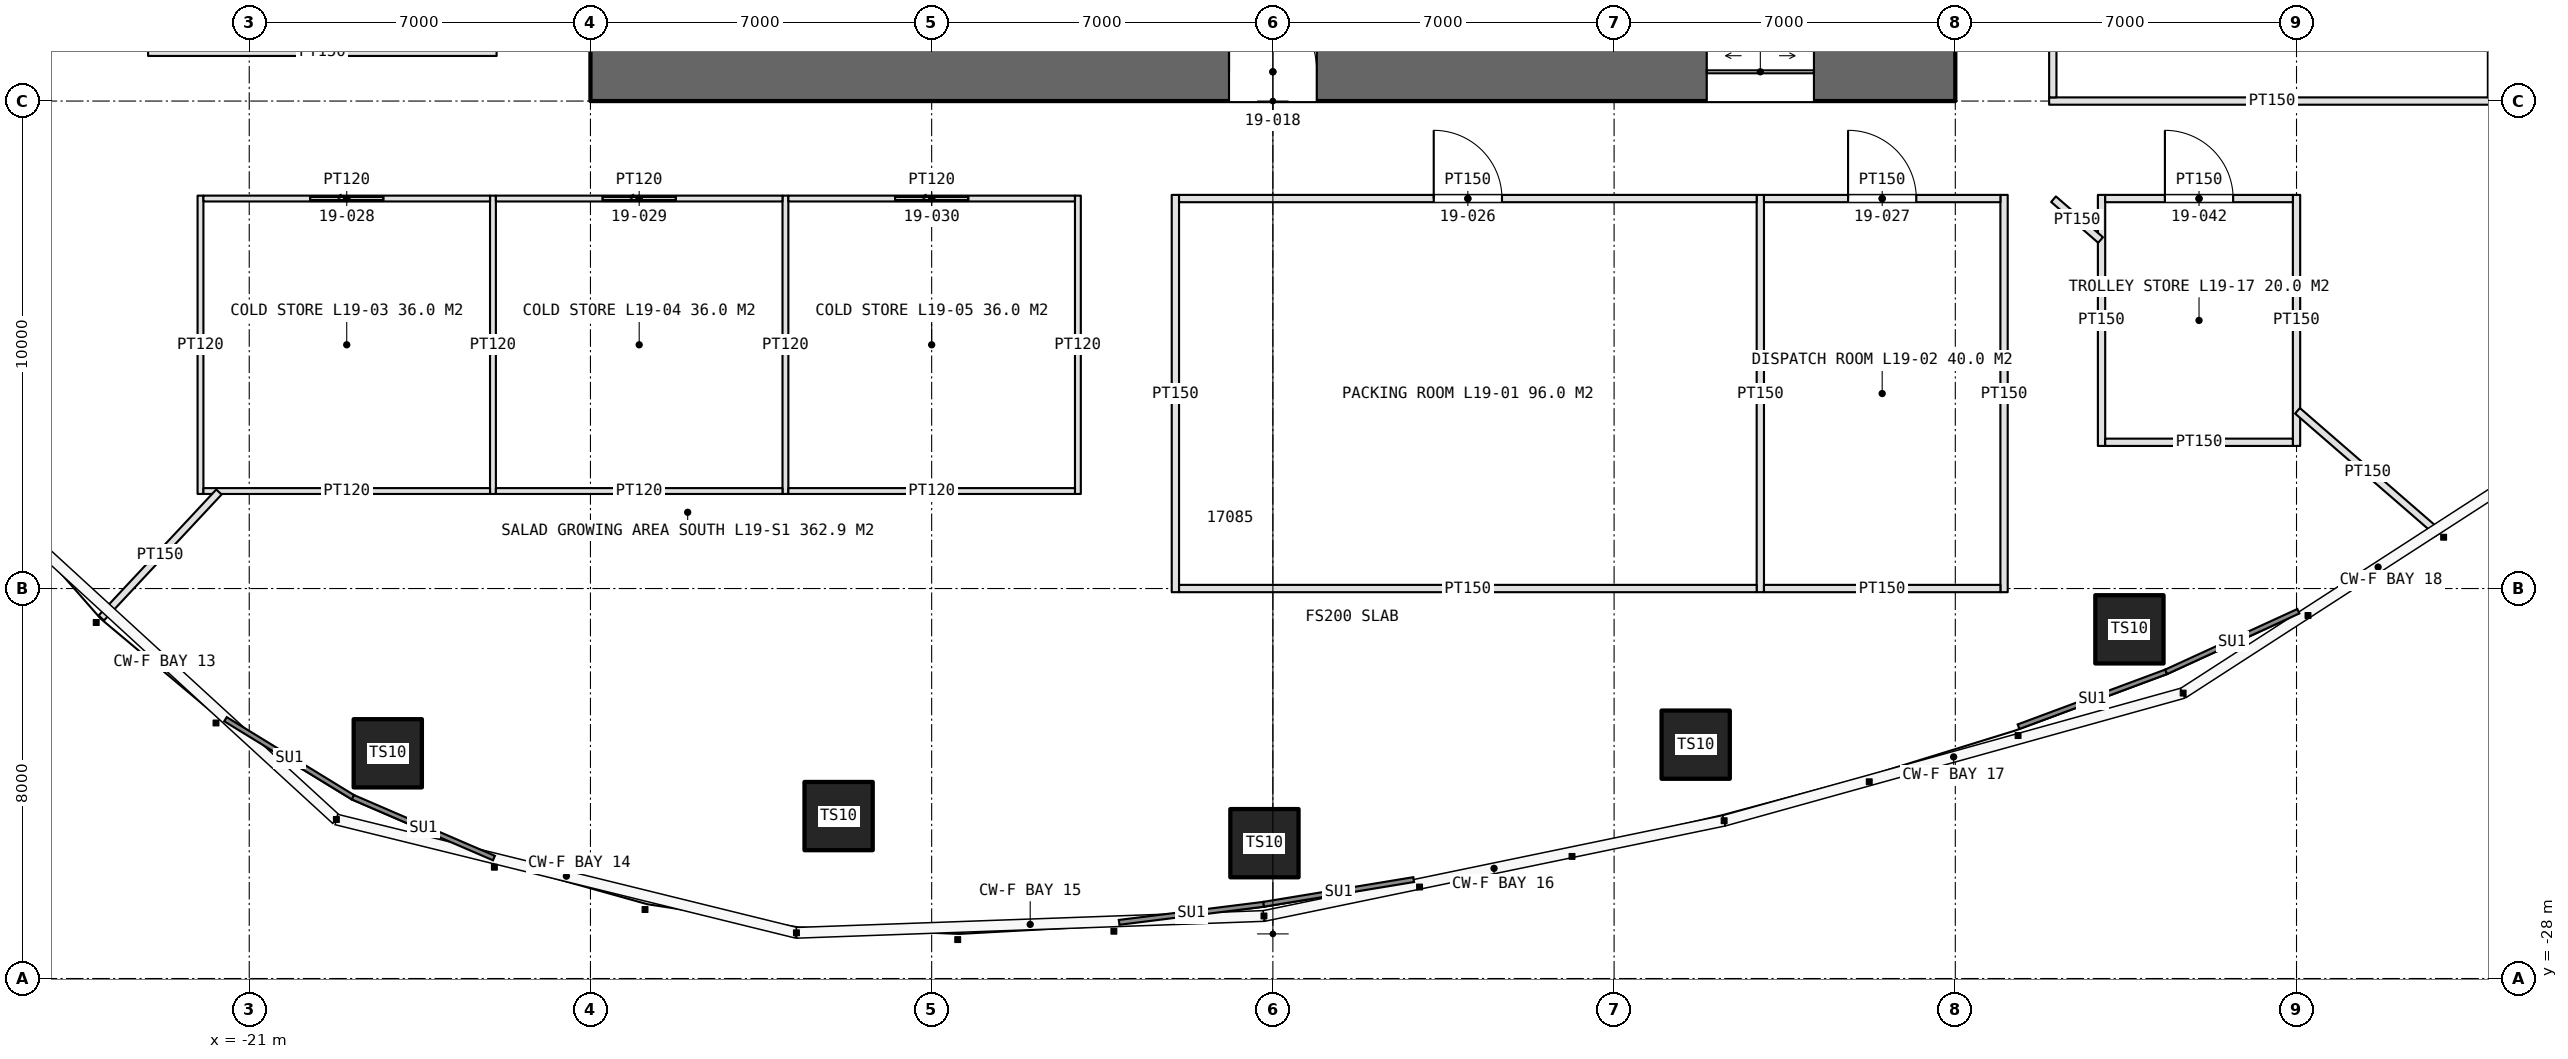
"""IFC4 building model, lengths in metres.
Left out: names, types, materials, properties, quantities, classifications, styles, units other than length and angle.
Written with IfcOpenShell. Run it as: python <this file> out.ifc"""

import sys

from ifc_helpers import new_model, si_unit, direction, frame, frame_2d, origin, origin_2d, place, context, subcontext, project, spatial, rectangle, hollow_rectangle, extrude, element, fill, save


model = new_model("IFC4")
c1 = context("Model", 3, precision=1e-05, world=origin(), true_north=direction((0.0, 1.0)))
c2 = subcontext(c1, "Body", "Model", "MODEL_VIEW")
j1 = project(units=[si_unit("LENGTHUNIT", "METRE"), si_unit("PLANEANGLEUNIT", "RADIAN")], contexts=[c1])
p1 = place(None, origin())
s1 = spatial("IfcSite", under=j1, at=p1, CompositionType="ELEMENT")
p2 = place(p1, origin())
s2 = spatial("IfcBuilding", under=s1, at=p2, CompositionType="ELEMENT")
p3 = place(p2, frame((0.0, 0.0, 95.0)))
s3 = spatial("IfcBuildingStorey", under=s2, at=p3, CompositionType="ELEMENT", Elevation=95.0)
p4 = place(p3, frame((-14.0, -9.4, 0.0), z_axis=(0.0, 0.0, 1.0), x_axis=(1.0, 0.0, 0.0)))
e1 = element("IfcWall", 1, at=p4, inside=s3, PredefinedType="SHEAR", context=c2, shape_type="SweptSolid", body=[
    extrude(rectangle(XDim=28.0, YDim=1.2, at=frame_2d((14.0, 0.0))), origin(), (0.0, 0.0, 1.0), 5.0),
])
p5 = place(p4, frame((13.1, 0.0, 0.0)))
e2 = element("IfcOpeningElement", 2, at=p5, cuts=e1, PredefinedType="OPENING", context=c2, shape_type="SweptSolid", body=[
    extrude(rectangle(XDim=1.8, YDim=2.4, at=frame_2d((0.9, 1.2))), frame((0.0, 0.61, 0.0), z_axis=(0.0, -1.0, 0.0), x_axis=(1.0, 0.0, 0.0)), (0.0, 0.0, 1.0), 1.22),
])
p6 = place(p4, frame((22.9, 0.0, 0.0)))
e3 = element("IfcOpeningElement", 3, at=p6, cuts=e1, PredefinedType="OPENING", context=c2, shape_type="SweptSolid", body=[
    extrude(rectangle(XDim=2.2, YDim=2.7, at=frame_2d((1.1, 1.35))), frame((0.0, 0.61, 0.0), z_axis=(0.0, -1.0, 0.0), x_axis=(1.0, 0.0, 0.0)), (0.0, 0.0, 1.0), 1.22),
])
p7 = place(p3, frame((-18.158, -23.38, 0.0), z_axis=(0.0, 0.0, 1.0), x_axis=(1.0, 0.0, 0.0)))
e4 = element("IfcColumn", 4, at=p7, inside=s3, PredefinedType="COLUMN", context=c2, shape_type="SweptSolid", body=[
    extrude(hollow_rectangle(XDim=1.4, YDim=1.4, WallThickness=0.15, at=origin_2d()), origin(), (0.0, 0.0, 1.0), 4.025),
])
for number, where, z_axis, x_axis in (
    (5, (-8.909, -24.668, 0.0), (0.0, 0.0, 1.0), (1.0, 0.0, 0.0)),
    (6, (-0.173, -25.224, 0.0), (0.0, 0.0, 1.0), (1.0, 0.0, 0.0)),
    (7, (8.674, -23.203, 0.0), (0.0, 0.0, 1.0), (1.0, 0.0, 0.0)),
):
    element("IfcColumn", number, at=place(p3, frame(where, z_axis=z_axis, x_axis=x_axis)), inside=s3, PredefinedType="COLUMN", context=c2, shape_type="SweptSolid", body=[
        extrude(hollow_rectangle(XDim=1.4, YDim=1.4, WallThickness=0.15, at=origin_2d()), origin(), (0.0, 0.0, 1.0), 5.0),
    ])
p8 = place(p3, frame((17.572, -20.837, 0.0), z_axis=(0.0, 0.0, 1.0), x_axis=(1.0, 0.0, 0.0)))
e8 = element("IfcColumn", 8, at=p8, inside=s3, PredefinedType="COLUMN", context=c2, shape_type="SweptSolid", body=[
    extrude(hollow_rectangle(XDim=1.4, YDim=1.4, WallThickness=0.15, at=origin_2d()), origin(), (0.0, 0.0, 1.0), 4.025),
])
for number, where, z_axis, x_axis in (
    (9, (-2.0, -11.925, 0.0), (0.0, 0.0, 1.0), (0.0, -1.0, 0.0)),
    (10, (10.0, -11.925, 0.0), (0.0, 0.0, 1.0), (0.0, -1.0, 0.0)),
    (11, (15.0, -11.925, 0.0), (0.0, 0.0, 1.0), (0.0, -1.0, 0.0)),
):
    element("IfcWall", number, at=place(p3, frame(where, z_axis=z_axis, x_axis=x_axis)), inside=s3, PredefinedType="PARTITIONING", context=c2, shape_type="SweptSolid", body=[
        extrude(rectangle(XDim=8.15, YDim=0.15, at=frame_2d((4.075, 0.0))), origin(), (0.0, 0.0, 1.0), 3.6),
    ])
p9 = place(p3, frame((-1.925, -12.0, 0.0), z_axis=(0.0, 0.0, 1.0), x_axis=(1.0, 0.0, 0.0)))
e12 = element("IfcWall", 12, at=p9, inside=s3, PredefinedType="PARTITIONING", context=c2, shape_type="SweptSolid", body=[
    extrude(rectangle(XDim=11.85, YDim=0.15, at=frame_2d((5.925, 0.0))), origin(), (0.0, 0.0, 1.0), 3.6),
])
p10 = place(p9, frame((5.225, 0.0, 0.0)))
e13 = element("IfcOpeningElement", 13, at=p10, cuts=e12, PredefinedType="OPENING", context=c2, shape_type="SweptSolid", body=[
    extrude(rectangle(XDim=1.4, YDim=2.4, at=frame_2d((0.7, 1.2))), frame((0.0, 0.085, 0.0), z_axis=(0.0, -1.0, 0.0), x_axis=(1.0, 0.0, 0.0)), (0.0, 0.0, 1.0), 0.17),
])
p11 = place(p3, frame((-1.925, -20.0, 0.0), z_axis=(0.0, 0.0, 1.0), x_axis=(1.0, 0.0, 0.0)))
e14 = element("IfcWall", 14, at=p11, inside=s3, PredefinedType="PARTITIONING", context=c2, shape_type="SweptSolid", body=[
    extrude(rectangle(XDim=11.85, YDim=0.15, at=frame_2d((5.925, 0.0))), origin(), (0.0, 0.0, 1.0), 3.6),
])
p12 = place(p3, frame((10.075, -12.0, 0.0), z_axis=(0.0, 0.0, 1.0), x_axis=(1.0, 0.0, 0.0)))
e15 = element("IfcWall", 15, at=p12, inside=s3, PredefinedType="PARTITIONING", context=c2, shape_type="SweptSolid", body=[
    extrude(rectangle(XDim=4.85, YDim=0.15, at=frame_2d((2.425, 0.0))), origin(), (0.0, 0.0, 1.0), 3.6),
])
p13 = place(p12, frame((1.725, 0.0, 0.0)))
e16 = element("IfcOpeningElement", 16, at=p13, cuts=e15, PredefinedType="OPENING", context=c2, shape_type="SweptSolid", body=[
    extrude(rectangle(XDim=1.4, YDim=2.4, at=frame_2d((0.7, 1.2))), frame((0.0, 0.085, 0.0), z_axis=(0.0, -1.0, 0.0), x_axis=(1.0, 0.0, 0.0)), (0.0, 0.0, 1.0), 0.17),
])
p14 = place(p3, frame((10.075, -20.0, 0.0), z_axis=(0.0, 0.0, 1.0), x_axis=(1.0, 0.0, 0.0)))
e17 = element("IfcWall", 17, at=p14, inside=s3, PredefinedType="PARTITIONING", context=c2, shape_type="SweptSolid", body=[
    extrude(rectangle(XDim=4.85, YDim=0.15, at=frame_2d((2.425, 0.0))), origin(), (0.0, 0.0, 1.0), 3.6),
])
for number, where, z_axis, x_axis in (
    (18, (-22.0, -11.94, 0.0), (0.0, 0.0, 1.0), (0.0, -1.0, 0.0)),
    (19, (-16.0, -11.94, 0.0), (0.0, 0.0, 1.0), (0.0, -1.0, 0.0)),
    (20, (-10.0, -11.94, 0.0), (0.0, 0.0, 1.0), (0.0, -1.0, 0.0)),
    (21, (-4.0, -11.94, 0.0), (0.0, 0.0, 1.0), (0.0, -1.0, 0.0)),
):
    element("IfcWall", number, at=place(p3, frame(where, z_axis=z_axis, x_axis=x_axis)), inside=s3, PredefinedType="PARTITIONING", context=c2, shape_type="SweptSolid", body=[
        extrude(rectangle(XDim=6.12, YDim=0.12, at=frame_2d((3.06, 0.0))), origin(), (0.0, 0.0, 1.0), 3.6),
    ])
p15 = place(p3, frame((-21.94, -12.0, 0.0), z_axis=(0.0, 0.0, 1.0), x_axis=(1.0, 0.0, 0.0)))
e22 = element("IfcWall", 22, at=p15, inside=s3, PredefinedType="PARTITIONING", context=c2, shape_type="SweptSolid", body=[
    extrude(rectangle(XDim=5.88, YDim=0.12, at=frame_2d((2.94, 0.0))), origin(), (0.0, 0.0, 1.0), 3.6),
])
p16 = place(p15, frame((2.19, 0.0, 0.0)))
e23 = element("IfcOpeningElement", 23, at=p16, cuts=e22, PredefinedType="OPENING", context=c2, shape_type="SweptSolid", body=[
    extrude(rectangle(XDim=1.5, YDim=2.5, at=frame_2d((0.75, 1.25))), frame((0.0, 0.07, 0.0), z_axis=(0.0, -1.0, 0.0), x_axis=(1.0, 0.0, 0.0)), (0.0, 0.0, 1.0), 0.14),
])
p17 = place(p3, frame((-21.94, -18.0, 0.0), z_axis=(0.0, 0.0, 1.0), x_axis=(1.0, 0.0, 0.0)))
e24 = element("IfcWall", 24, at=p17, inside=s3, PredefinedType="PARTITIONING", context=c2, shape_type="SweptSolid", body=[
    extrude(rectangle(XDim=5.88, YDim=0.12, at=frame_2d((2.94, 0.0))), origin(), (0.0, 0.0, 1.0), 3.6),
])
p18 = place(p3, frame((-15.94, -12.0, 0.0), z_axis=(0.0, 0.0, 1.0), x_axis=(1.0, 0.0, 0.0)))
e25 = element("IfcWall", 25, at=p18, inside=s3, PredefinedType="PARTITIONING", context=c2, shape_type="SweptSolid", body=[
    extrude(rectangle(XDim=5.88, YDim=0.12, at=frame_2d((2.94, 0.0))), origin(), (0.0, 0.0, 1.0), 3.6),
])
p19 = place(p18, frame((2.19, 0.0, 0.0)))
e26 = element("IfcOpeningElement", 26, at=p19, cuts=e25, PredefinedType="OPENING", context=c2, shape_type="SweptSolid", body=[
    extrude(rectangle(XDim=1.5, YDim=2.5, at=frame_2d((0.75, 1.25))), frame((0.0, 0.07, 0.0), z_axis=(0.0, -1.0, 0.0), x_axis=(1.0, 0.0, 0.0)), (0.0, 0.0, 1.0), 0.14),
])
p20 = place(p3, frame((-15.94, -18.0, 0.0), z_axis=(0.0, 0.0, 1.0), x_axis=(1.0, 0.0, 0.0)))
e27 = element("IfcWall", 27, at=p20, inside=s3, PredefinedType="PARTITIONING", context=c2, shape_type="SweptSolid", body=[
    extrude(rectangle(XDim=5.88, YDim=0.12, at=frame_2d((2.94, 0.0))), origin(), (0.0, 0.0, 1.0), 3.6),
])
p21 = place(p3, frame((-9.94, -12.0, 0.0), z_axis=(0.0, 0.0, 1.0), x_axis=(1.0, 0.0, 0.0)))
e28 = element("IfcWall", 28, at=p21, inside=s3, PredefinedType="PARTITIONING", context=c2, shape_type="SweptSolid", body=[
    extrude(rectangle(XDim=5.88, YDim=0.12, at=frame_2d((2.94, 0.0))), origin(), (0.0, 0.0, 1.0), 3.6),
])
p22 = place(p21, frame((2.19, 0.0, 0.0)))
e29 = element("IfcOpeningElement", 29, at=p22, cuts=e28, PredefinedType="OPENING", context=c2, shape_type="SweptSolid", body=[
    extrude(rectangle(XDim=1.5, YDim=2.5, at=frame_2d((0.75, 1.25))), frame((0.0, 0.07, 0.0), z_axis=(0.0, -1.0, 0.0), x_axis=(1.0, 0.0, 0.0)), (0.0, 0.0, 1.0), 0.14),
])
p23 = place(p3, frame((-9.94, -18.0, 0.0), z_axis=(0.0, 0.0, 1.0), x_axis=(1.0, 0.0, 0.0)))
e30 = element("IfcWall", 30, at=p23, inside=s3, PredefinedType="PARTITIONING", context=c2, shape_type="SweptSolid", body=[
    extrude(rectangle(XDim=5.88, YDim=0.12, at=frame_2d((2.94, 0.0))), origin(), (0.0, 0.0, 1.0), 3.6),
])
p24 = place(p3, frame((15.925, -10.0, 0.0), z_axis=(0.0, 0.0, 1.0), x_axis=(1.0, 0.0, 0.0)))
e31 = element("IfcWall", 31, at=p24, inside=s3, PredefinedType="PARTITIONING", context=c2, shape_type="SweptSolid", body=[
    extrude(rectangle(XDim=9.15, YDim=0.15, at=frame_2d((4.575, 0.0))), origin(), (0.0, 0.0, 1.0), 3.6),
])
p25 = place(p3, frame((16.0, -9.925, 0.0), z_axis=(0.0, 0.0, 1.0), x_axis=(0.0, 1.0, 0.0)))
e32 = element("IfcWall", 32, at=p25, inside=s3, PredefinedType="PARTITIONING", context=c2, shape_type="SweptSolid", body=[
    extrude(rectangle(XDim=7.85, YDim=0.15, at=frame_2d((3.925, 0.0))), origin(), (0.0, 0.0, 1.0), 3.6),
])
p26 = place(p25, frame((3.225, 0.0, 0.0)))
e33 = element("IfcOpeningElement", 33, at=p26, cuts=e32, PredefinedType="OPENING", context=c2, shape_type="SweptSolid", body=[
    extrude(rectangle(XDim=1.4, YDim=2.4, at=frame_2d((0.7, 1.2))), frame((0.0, 0.085, 0.0), z_axis=(0.0, -1.0, 0.0), x_axis=(1.0, 0.0, 0.0)), (0.0, 0.0, 1.0), 0.17),
])
p27 = place(p3, frame((-15.925, -9.0, 0.0), z_axis=(0.0, 0.0, 1.0), x_axis=(-1.0, 0.0, 0.0)))
e34 = element("IfcWall", 34, at=p27, inside=s3, PredefinedType="PARTITIONING", context=c2, shape_type="SweptSolid", body=[
    extrude(rectangle(XDim=7.15, YDim=0.15, at=frame_2d((3.575, 0.0))), origin(), (0.0, 0.0, 1.0), 3.6),
])
for number, where, z_axis, x_axis in (
    (35, (17.0, -11.925, 0.0), (0.0, 0.0, 1.0), (0.0, -1.0, 0.0)),
    (36, (21.0, -11.925, 0.0), (0.0, 0.0, 1.0), (0.0, -1.0, 0.0)),
):
    element("IfcWall", number, at=place(p3, frame(where, z_axis=z_axis, x_axis=x_axis)), inside=s3, PredefinedType="PARTITIONING", context=c2, shape_type="SweptSolid", body=[
        extrude(rectangle(XDim=5.15, YDim=0.15, at=frame_2d((2.575, 0.0))), origin(), (0.0, 0.0, 1.0), 3.6),
    ])
p28 = place(p3, frame((17.075, -12.0, 0.0), z_axis=(0.0, 0.0, 1.0), x_axis=(1.0, 0.0, 0.0)))
e37 = element("IfcWall", 37, at=p28, inside=s3, PredefinedType="PARTITIONING", context=c2, shape_type="SweptSolid", body=[
    extrude(rectangle(XDim=3.85, YDim=0.15, at=frame_2d((1.925, 0.0))), origin(), (0.0, 0.0, 1.0), 3.6),
])
p29 = place(p28, frame((1.225, 0.0, 0.0)))
e38 = element("IfcOpeningElement", 38, at=p29, cuts=e37, PredefinedType="OPENING", context=c2, shape_type="SweptSolid", body=[
    extrude(rectangle(XDim=1.4, YDim=2.4, at=frame_2d((0.7, 1.2))), frame((0.0, 0.085, 0.0), z_axis=(0.0, -1.0, 0.0), x_axis=(1.0, 0.0, 0.0)), (0.0, 0.0, 1.0), 0.17),
])
p30 = place(p3, frame((17.075, -17.0, 0.0), z_axis=(0.0, 0.0, 1.0), x_axis=(1.0, 0.0, 0.0)))
e39 = element("IfcWall", 39, at=p30, inside=s3, PredefinedType="PARTITIONING", context=c2, shape_type="SweptSolid", body=[
    extrude(rectangle(XDim=3.85, YDim=0.15, at=frame_2d((1.925, 0.0))), origin(), (0.0, 0.0, 1.0), 3.6),
])
p31 = place(p3, frame((-21.622, -18.02, 0.0), z_axis=(0.0, 0.0, 1.0), x_axis=(-0.682522451791, -0.730864626864, 0.0)))
e40 = element("IfcWall", 40, at=p31, inside=s3, PredefinedType="PARTITIONING", context=c2, shape_type="SweptSolid", body=[
    extrude(rectangle(XDim=3.535, YDim=0.15, at=frame_2d((1.768, 0.0))), origin(), (0.0, 0.0, 1.0), 3.6),
])
p32 = place(p3, frame((21.02, -16.354, 0.0), z_axis=(0.0, 0.0, 1.0), x_axis=(0.755425653008, -0.655234372402, 0.0)))
e41 = element("IfcWall", 41, at=p32, inside=s3, PredefinedType="PARTITIONING", context=c2, shape_type="SweptSolid", body=[
    extrude(rectangle(XDim=3.823, YDim=0.15, at=frame_2d((1.912, 0.0))), origin(), (0.0, 0.0, 1.0), 3.6),
])
p33 = place(p3, frame((16.015, -12.013, 0.0), z_axis=(0.0, 0.0, 1.0), x_axis=(0.755411512729, -0.655250674503, 0.0)))
e42 = element("IfcWall", 42, at=p33, inside=s3, PredefinedType="PARTITIONING", context=c2, shape_type="SweptSolid", body=[
    extrude(rectangle(XDim=1.277, YDim=0.15, at=frame_2d((0.639, 0.0))), origin(), (0.0, 0.0, 1.0), 3.6),
])
p34 = place(p5, origin())
e43 = element("IfcDoor", 43, at=p34, inside=s3, OperationType="DOUBLE_DOOR_SINGLE_SWING", PredefinedType="DOOR", context=c2, shape_type="SweptSolid", body=[
    extrude(rectangle(XDim=1.8, YDim=2.4, at=frame_2d((0.9, 1.2))), frame((0.0, 0.025, 0.0), z_axis=(0.0, -1.0, 0.0), x_axis=(1.0, 0.0, 0.0)), (0.0, 0.0, 1.0), 0.05),
])
fill(e2, e43)
p35 = place(p6, origin())
e44 = element("IfcDoor", 44, at=p35, inside=s3, OperationType="DOUBLE_DOOR_SLIDING", PredefinedType="DOOR", context=c2, shape_type="SweptSolid", body=[
    extrude(rectangle(XDim=2.2, YDim=2.7, at=frame_2d((1.1, 1.35))), frame((0.0, 0.025, 0.0), z_axis=(0.0, -1.0, 0.0), x_axis=(1.0, 0.0, 0.0)), (0.0, 0.0, 1.0), 0.05),
])
fill(e3, e44)
p36 = place(p10, origin())
e45 = element("IfcDoor", 45, at=p36, inside=s3, OperationType="DOUBLE_DOOR_DOUBLE_SWING", PredefinedType="DOOR", context=c2, shape_type="SweptSolid", body=[
    extrude(rectangle(XDim=1.4, YDim=2.4, at=frame_2d((0.7, 1.2))), frame((0.0, 0.025, 0.0), z_axis=(0.0, -1.0, 0.0), x_axis=(1.0, 0.0, 0.0)), (0.0, 0.0, 1.0), 0.05),
])
fill(e13, e45)
p37 = place(p13, origin())
e46 = element("IfcDoor", 46, at=p37, inside=s3, OperationType="DOUBLE_DOOR_DOUBLE_SWING", PredefinedType="DOOR", context=c2, shape_type="SweptSolid", body=[
    extrude(rectangle(XDim=1.4, YDim=2.4, at=frame_2d((0.7, 1.2))), frame((0.0, 0.025, 0.0), z_axis=(0.0, -1.0, 0.0), x_axis=(1.0, 0.0, 0.0)), (0.0, 0.0, 1.0), 0.05),
])
fill(e16, e46)
p38 = place(p16, origin())
e47 = element("IfcDoor", 47, at=p38, inside=s3, OperationType="SLIDING_TO_LEFT", PredefinedType="DOOR", context=c2, shape_type="SweptSolid", body=[
    extrude(rectangle(XDim=1.5, YDim=2.5, at=frame_2d((0.75, 1.25))), frame((0.0, 0.025, 0.0), z_axis=(0.0, -1.0, 0.0), x_axis=(1.0, 0.0, 0.0)), (0.0, 0.0, 1.0), 0.05),
])
fill(e23, e47)
p39 = place(p19, origin())
e48 = element("IfcDoor", 48, at=p39, inside=s3, OperationType="SLIDING_TO_LEFT", PredefinedType="DOOR", context=c2, shape_type="SweptSolid", body=[
    extrude(rectangle(XDim=1.5, YDim=2.5, at=frame_2d((0.75, 1.25))), frame((0.0, 0.025, 0.0), z_axis=(0.0, -1.0, 0.0), x_axis=(1.0, 0.0, 0.0)), (0.0, 0.0, 1.0), 0.05),
])
fill(e26, e48)
p40 = place(p22, origin())
e49 = element("IfcDoor", 49, at=p40, inside=s3, OperationType="SLIDING_TO_LEFT", PredefinedType="DOOR", context=c2, shape_type="SweptSolid", body=[
    extrude(rectangle(XDim=1.5, YDim=2.5, at=frame_2d((0.75, 1.25))), frame((0.0, 0.025, 0.0), z_axis=(0.0, -1.0, 0.0), x_axis=(1.0, 0.0, 0.0)), (0.0, 0.0, 1.0), 0.05),
])
fill(e29, e49)
p41 = place(p29, origin())
e50 = element("IfcDoor", 50, at=p41, inside=s3, OperationType="DOUBLE_DOOR_DOUBLE_SWING", PredefinedType="DOOR", context=c2, shape_type="SweptSolid", body=[
    extrude(rectangle(XDim=1.4, YDim=2.4, at=frame_2d((0.7, 1.2))), frame((0.0, 0.025, 0.0), z_axis=(0.0, -1.0, 0.0), x_axis=(1.0, 0.0, 0.0)), (0.0, 0.0, 1.0), 0.05),
])
fill(e38, e50)
save(model, sys.argv[1])
